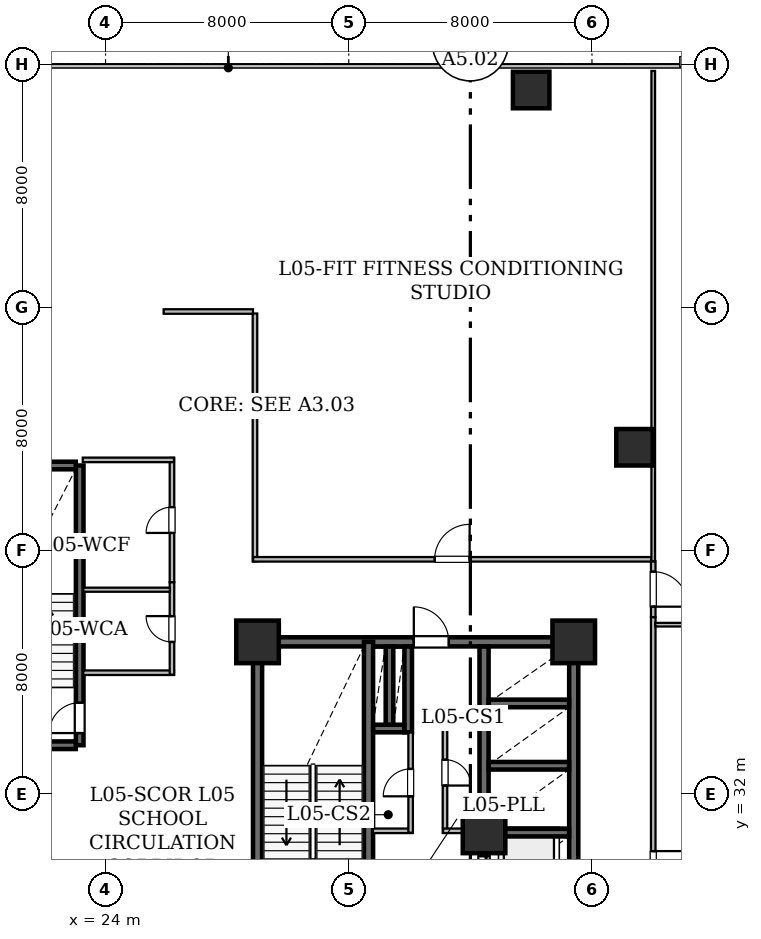
"""IFC4 building model, lengths in metres.
Left out: names, types, materials, properties, quantities, classifications, styles, units other than length and angle.
Written with IfcOpenShell. Run it as: python <this file> out.ifc"""

import sys

from ifc_helpers import new_model, si_unit, direction, frame, frame_2d, origin, origin_2d, place, context, subcontext, project, spatial, rectangle, hollow_rectangle, extrude, element, fill, save


model = new_model("IFC4")
c1 = context("Model", 3, precision=1e-05, world=origin(), true_north=direction((0.0, 1.0)))
c2 = subcontext(c1, "Body", "Model", "MODEL_VIEW")
j1 = project(units=[si_unit("LENGTHUNIT", "METRE"), si_unit("PLANEANGLEUNIT", "RADIAN")], contexts=[c1])
p1 = place(None, origin())
s1 = spatial("IfcSite", under=j1, at=p1, CompositionType="ELEMENT")
p2 = place(p1, origin())
s2 = spatial("IfcBuilding", under=s1, at=p2, CompositionType="ELEMENT")
p3 = place(p2, frame((0.0, 0.0, 24.6)))
s3 = spatial("IfcBuildingStorey", under=s2, at=p3, CompositionType="ELEMENT", Elevation=24.6)
for number, where, z_axis, x_axis in (
    (1, (29.0, 37.0, 0.0), (0.0, 0.0, 1.0), (1.0, 0.0, 0.0)),
    (2, (36.45, 30.75, 0.0), (0.0, 0.0, 1.0), (1.0, 0.0, 0.0)),
    (3, (39.4, 37.0, 0.0), (0.0, 0.0, 1.0), (1.0, 0.0, 0.0)),
):
    element("IfcColumn", number, at=place(p3, frame(where, z_axis=z_axis, x_axis=x_axis)), inside=s3, PredefinedType="COLUMN", context=c2, shape_type="SweptSolid", body=[
        extrude(hollow_rectangle(XDim=1.4, YDim=1.4, WallThickness=0.07, at=origin_2d()), origin(), (0.0, 0.0, 1.0), 4.2),
    ])
for number, where, z_axis, x_axis in (
    (4, (38.0, 55.15, 0.0), (0.0, 0.0, 1.0), (1.0, 0.0, 0.0)),
    (5, (41.4, 43.4, 0.0), (0.0, 0.0, 1.0), (1.0, 0.0, 0.0)),
):
    element("IfcColumn", number, at=place(p3, frame(where, z_axis=z_axis, x_axis=x_axis)), inside=s3, PredefinedType="COLUMN", context=c2, shape_type="SweptSolid", body=[
        extrude(hollow_rectangle(XDim=1.2, YDim=1.2, WallThickness=0.06, at=origin_2d()), origin(), (0.0, 0.0, 1.0), 4.2),
    ])
p4 = place(p3, frame((29.0, 28.0, 0.0), z_axis=(0.0, 0.0, 1.0), x_axis=(0.0, 1.0, 0.0)))
e6 = element("IfcWall", 6, at=p4, inside=s3, PredefinedType="SHEAR", context=c2, shape_type="SweptSolid", body=[
    extrude(rectangle(XDim=9.0, YDim=0.3, at=frame_2d((4.5, 0.0))), origin(), (0.0, 0.0, 1.0), 3.92),
])
p5 = place(p3, frame((29.0, 37.0, 0.0), z_axis=(0.0, 0.0, 1.0), x_axis=(1.0, 0.0, 0.0)))
e7 = element("IfcWall", 7, at=p5, inside=s3, PredefinedType="SHEAR", context=c2, shape_type="SweptSolid", body=[
    extrude(rectangle(XDim=10.4, YDim=0.3, at=frame_2d((5.2, 0.0))), origin(), (0.0, 0.0, 1.0), 3.92),
])
p6 = place(p5, frame((5.14, 0.0, 0.0)))
e8 = element("IfcOpeningElement", 8, at=p6, cuts=e7, PredefinedType="OPENING", context=c2, shape_type="SweptSolid", body=[
    extrude(rectangle(XDim=1.15, YDim=2.2, at=frame_2d((0.575, 1.1))), frame((0.0, 0.16, 0.0), z_axis=(0.0, -1.0, 0.0), x_axis=(1.0, 0.0, 0.0)), (0.0, 0.0, 1.0), 0.32),
])
p7 = place(p3, frame((39.4, 24.4, 0.0), z_axis=(0.0, 0.0, 1.0), x_axis=(0.0, 1.0, 0.0)))
e9 = element("IfcWall", 9, at=p7, inside=s3, PredefinedType="SHEAR", context=c2, shape_type="SweptSolid", body=[
    extrude(rectangle(XDim=12.6, YDim=0.3, at=frame_2d((6.3, 0.0))), origin(), (0.0, 0.0, 1.0), 3.92),
])
p8 = place(p3, frame((32.65, 28.0, 0.0), z_axis=(0.0, 0.0, 1.0), x_axis=(0.0, 1.0, 0.0)))
e10 = element("IfcWall", 10, at=p8, inside=s3, PredefinedType="SHEAR", context=c2, shape_type="SweptSolid", body=[
    extrude(rectangle(XDim=9.0, YDim=0.3, at=frame_2d((4.5, 0.0))), origin(), (0.0, 0.0, 1.0), 3.92),
])
p9 = place(p8, frame((0.72, 0.0, 0.0)))
e11 = element("IfcOpeningElement", 11, at=p9, cuts=e10, PredefinedType="OPENING", context=c2, shape_type="SweptSolid", body=[
    extrude(rectangle(XDim=1.0, YDim=2.15, at=frame_2d((0.5, 1.075))), frame((0.0, 0.16, 0.0), z_axis=(0.0, -1.0, 0.0), x_axis=(1.0, 0.0, 0.0)), (0.0, 0.0, 1.0), 0.32),
])
p10 = place(p3, frame((36.45, 25.1, 0.0), z_axis=(0.0, 0.0, 1.0), x_axis=(0.0, 1.0, 0.0)))
e12 = element("IfcWall", 12, at=p10, inside=s3, PredefinedType="SHEAR", context=c2, shape_type="SweptSolid", body=[
    extrude(rectangle(XDim=4.95, YDim=0.3, at=frame_2d((2.475, 0.0))), origin(), (0.0, 0.0, 1.0), 3.92),
])
p11 = place(p10, frame((0.12, 0.0, 0.0)))
e13 = element("IfcOpeningElement", 13, at=p11, cuts=e12, PredefinedType="OPENING", context=c2, shape_type="SweptSolid", body=[
    extrude(rectangle(XDim=1.05, YDim=2.15, at=frame_2d((0.525, 1.075))), frame((0.0, 0.16, 0.0), z_axis=(0.0, -1.0, 0.0), x_axis=(1.0, 0.0, 0.0)), (0.0, 0.0, 1.0), 0.32),
])
p12 = place(p10, frame((1.995, 0.0, 0.0)))
e14 = element("IfcOpeningElement", 14, at=p12, cuts=e12, PredefinedType="OPENING", context=c2, shape_type="SweptSolid", body=[
    extrude(rectangle(XDim=1.05, YDim=2.15, at=frame_2d((0.525, 1.075))), frame((0.0, 0.16, 0.0), z_axis=(0.0, -1.0, 0.0), x_axis=(1.0, 0.0, 0.0)), (0.0, 0.0, 1.0), 0.32),
])
p13 = place(p10, frame((3.795, 0.0, 0.0)))
e15 = element("IfcOpeningElement", 15, at=p13, cuts=e12, PredefinedType="OPENING", context=c2, shape_type="SweptSolid", body=[
    extrude(rectangle(XDim=1.05, YDim=2.15, at=frame_2d((0.525, 1.075))), frame((0.0, 0.16, 0.0), z_axis=(0.0, -1.0, 0.0), x_axis=(1.0, 0.0, 0.0)), (0.0, 0.0, 1.0), 0.32),
])
p14 = place(p3, frame((36.45, 31.45, 0.0), z_axis=(0.0, 0.0, 1.0), x_axis=(0.0, 1.0, 0.0)))
e16 = element("IfcWall", 16, at=p14, inside=s3, PredefinedType="SHEAR", context=c2, shape_type="SweptSolid", body=[
    extrude(rectangle(XDim=5.396, YDim=0.3, at=frame_2d((2.698, 0.0))), origin(), (0.0, 0.0, 1.0), 3.92),
])
for number, where, z_axis, x_axis in (
    (17, (36.604, 30.725, 0.0), (0.0, 0.0, 1.0), (1.0, 0.0, 0.0)),
    (18, (36.604, 32.925, 0.0), (0.0, 0.0, 1.0), (1.0, 0.0, 0.0)),
    (19, (36.604, 34.975, 0.0), (0.0, 0.0, 1.0), (1.0, 0.0, 0.0)),
):
    element("IfcWall", number, at=place(p3, frame(where, z_axis=z_axis, x_axis=x_axis)), inside=s3, PredefinedType="SHEAR", context=c2, shape_type="SweptSolid", body=[
        extrude(rectangle(XDim=2.642, YDim=0.25, at=frame_2d((1.321, 0.0))), origin(), (0.0, 0.0, 1.0), 3.92),
    ])
p15 = place(p3, frame((33.955, 34.025, 0.0), z_axis=(0.0, 0.0, 1.0), x_axis=(0.0, 1.0, 0.0)))
e20 = element("IfcWall", 20, at=p15, inside=s3, PredefinedType="SHEAR", context=c2, shape_type="SweptSolid", body=[
    extrude(rectangle(XDim=2.821, YDim=0.25, at=frame_2d((1.411, 0.0))), origin(), (0.0, 0.0, 1.0), 3.92),
])
p16 = place(p3, frame((32.804, 34.15, 0.0), z_axis=(0.0, 0.0, 1.0), x_axis=(1.0, 0.0, 0.0)))
e21 = element("IfcWall", 21, at=p16, inside=s3, PredefinedType="SHEAR", context=c2, shape_type="SweptSolid", body=[
    extrude(rectangle(XDim=1.022, YDim=0.25, at=frame_2d((0.511, 0.0))), origin(), (0.0, 0.0, 1.0), 3.92),
])
p17 = place(p3, frame((33.34, 34.279, 0.0), z_axis=(0.0, 0.0, 1.0), x_axis=(0.0, 1.0, 0.0)))
e22 = element("IfcWall", 22, at=p17, inside=s3, PredefinedType="SHEAR", context=c2, shape_type="SweptSolid", body=[
    extrude(rectangle(XDim=2.567, YDim=0.25, at=frame_2d((1.283, 0.0))), origin(), (0.0, 0.0, 1.0), 3.92),
])
p18 = place(p3, frame((23.15, 33.6, 0.0), z_axis=(0.0, 0.0, 1.0), x_axis=(0.0, 1.0, 0.0)))
e23 = element("IfcWall", 23, at=p18, inside=s3, PredefinedType="SHEAR", context=c2, shape_type="SweptSolid", body=[
    extrude(rectangle(XDim=9.2, YDim=0.25, at=frame_2d((4.6, 0.0))), origin(), (0.0, 0.0, 1.0), 3.92),
])
p19 = place(p18, frame((0.4, 0.0, 0.0)))
e24 = element("IfcOpeningElement", 24, at=p19, cuts=e23, PredefinedType="OPENING", context=c2, shape_type="SweptSolid", body=[
    extrude(rectangle(XDim=1.0, YDim=2.15, at=frame_2d((0.5, 1.075))), frame((0.0, 0.135, 0.0), z_axis=(0.0, -1.0, 0.0), x_axis=(1.0, 0.0, 0.0)), (0.0, 0.0, 1.0), 0.27),
])
for number, where, z_axis, x_axis in (
    (25, (19.329, 33.6, 0.0), (0.0, 0.0, 1.0), (1.0, 0.0, 0.0)),
    (26, (19.329, 42.8, 0.0), (0.0, 0.0, 1.0), (1.0, 0.0, 0.0)),
):
    element("IfcWall", number, at=place(p3, frame(where, z_axis=z_axis, x_axis=x_axis)), inside=s3, PredefinedType="SHEAR", context=c2, shape_type="SweptSolid", body=[
        extrude(rectangle(XDim=3.692, YDim=0.25, at=frame_2d((1.846, 0.0))), origin(), (0.0, 0.0, 1.0), 3.92),
    ])
p20 = place(p3, frame((36.306, 34.615, 0.0), z_axis=(0.0, 0.0, 1.0), x_axis=(-1.0, 0.0, 0.0)))
e27 = element("IfcWall", 27, at=p20, inside=s3, PredefinedType="STANDARD", context=c2, shape_type="SweptSolid", body=[
    extrude(rectangle(XDim=1.206, YDim=0.15, at=frame_2d((0.603, 0.0))), origin(), (0.0, 0.0, 1.0), 3.92),
])
p21 = place(p3, frame((35.165, 34.678, 0.0), z_axis=(0.0, 0.0, 1.0), x_axis=(0.0, -1.0, 0.0)))
e28 = element("IfcWall", 28, at=p21, inside=s3, PredefinedType="STANDARD", context=c2, shape_type="SweptSolid", body=[
    extrude(rectangle(XDim=3.958, YDim=0.15, at=frame_2d((1.979, 0.0))), origin(), (0.0, 0.0, 1.0), 3.92),
])
p22 = place(p21, frame((1.554, 0.0, 0.0)))
e29 = element("IfcOpeningElement", 29, at=p22, cuts=e28, PredefinedType="OPENING", context=c2, shape_type="SweptSolid", body=[
    extrude(rectangle(XDim=0.85, YDim=2.1, at=frame_2d((0.425, 1.05))), frame((0.0, 0.085, 0.0), z_axis=(0.0, -1.0, 0.0), x_axis=(1.0, 0.0, 0.0)), (0.0, 0.0, 1.0), 0.17),
])
p23 = place(p3, frame((35.102, 30.785, 0.0), z_axis=(0.0, 0.0, 1.0), x_axis=(1.0, 0.0, 0.0)))
e30 = element("IfcWall", 30, at=p23, inside=s3, PredefinedType="STANDARD", context=c2, shape_type="SweptSolid", body=[
    extrude(rectangle(XDim=1.198, YDim=0.15, at=frame_2d((0.599, 0.0))), origin(), (0.0, 0.0, 1.0), 3.92),
])
p24 = place(p3, frame((32.794, 30.785, 0.0), z_axis=(0.0, 0.0, 1.0), x_axis=(1.0, 0.0, 0.0)))
e31 = element("IfcWall", 31, at=p24, inside=s3, PredefinedType="STANDARD", context=c2, shape_type="SweptSolid", body=[
    extrude(rectangle(XDim=1.306, YDim=0.15, at=frame_2d((0.653, 0.0))), origin(), (0.0, 0.0, 1.0), 3.377),
])
p25 = place(p3, frame((34.035, 30.72, 0.0), z_axis=(0.0, 0.0, 1.0), x_axis=(0.0, 1.0, 0.0)))
e32 = element("IfcWall", 32, at=p25, inside=s3, PredefinedType="STANDARD", context=c2, shape_type="SweptSolid", body=[
    extrude(rectangle(XDim=3.3, YDim=0.15, at=frame_2d((1.65, 0.0))), origin(), (0.0, 0.0, 1.0), 3.92),
])
p26 = place(p25, frame((1.2, 0.0, 0.0)))
e33 = element("IfcOpeningElement", 33, at=p26, cuts=e32, PredefinedType="OPENING", context=c2, shape_type="SweptSolid", body=[
    extrude(rectangle(XDim=0.9, YDim=2.1, at=frame_2d((0.45, 1.05))), frame((0.0, 0.085, 0.0), z_axis=(0.0, -1.0, 0.0), x_axis=(1.0, 0.0, 0.0)), (0.0, 0.0, 1.0), 0.17),
])
p27 = place(p3, frame((23.267, 35.985, 0.0), z_axis=(0.0, 0.0, 1.0), x_axis=(1.0, 0.0, 0.0)))
e34 = element("IfcWall", 34, at=p27, inside=s3, PredefinedType="STANDARD", context=c2, shape_type="SweptSolid", body=[
    extrude(rectangle(XDim=2.983, YDim=0.15, at=frame_2d((1.491, 0.0))), origin(), (0.0, 0.0, 1.0), 3.92),
])
p28 = place(p3, frame((26.185, 35.922, 0.0), z_axis=(0.0, 0.0, 1.0), x_axis=(0.0, 1.0, 0.0)))
e35 = element("IfcWall", 35, at=p28, inside=s3, PredefinedType="STANDARD", context=c2, shape_type="SweptSolid", body=[
    extrude(rectangle(XDim=3.042, YDim=0.15, at=frame_2d((1.521, 0.0))), origin(), (0.0, 0.0, 1.0), 3.92),
])
p29 = place(p28, frame((1.075, 0.0, 0.0)))
e36 = element("IfcOpeningElement", 36, at=p29, cuts=e35, PredefinedType="OPENING", context=c2, shape_type="SweptSolid", body=[
    extrude(rectangle(XDim=0.85, YDim=2.1, at=frame_2d((0.425, 1.05))), frame((0.0, 0.085, 0.0), z_axis=(0.0, -1.0, 0.0), x_axis=(1.0, 0.0, 0.0)), (0.0, 0.0, 1.0), 0.17),
])
p30 = place(p3, frame((26.185, 38.964, 0.0), z_axis=(0.0, 0.0, 1.0), x_axis=(0.0, 1.0, 0.0)))
e37 = element("IfcWall", 37, at=p30, inside=s3, PredefinedType="STANDARD", context=c2, shape_type="SweptSolid", body=[
    extrude(rectangle(XDim=4.086, YDim=0.15, at=frame_2d((2.043, 0.0))), origin(), (0.0, 0.0, 1.0), 3.92),
])
p31 = place(p30, frame((1.618, 0.0, 0.0)))
e38 = element("IfcOpeningElement", 38, at=p31, cuts=e37, PredefinedType="OPENING", context=c2, shape_type="SweptSolid", body=[
    extrude(rectangle(XDim=0.85, YDim=2.1, at=frame_2d((0.425, 1.05))), frame((0.0, 0.085, 0.0), z_axis=(0.0, -1.0, 0.0), x_axis=(1.0, 0.0, 0.0)), (0.0, 0.0, 1.0), 0.17),
])
p32 = place(p3, frame((26.25, 42.985, 0.0), z_axis=(0.0, 0.0, 1.0), x_axis=(-1.0, 0.0, 0.0)))
e39 = element("IfcWall", 39, at=p32, inside=s3, PredefinedType="STANDARD", context=c2, shape_type="SweptSolid", body=[
    extrude(rectangle(XDim=3.0, YDim=0.15, at=frame_2d((1.5, 0.0))), origin(), (0.0, 0.0, 1.0), 3.92),
])
p33 = place(p3, frame((42.015, 37.814, 0.0), z_axis=(0.0, 0.0, 1.0), x_axis=(0.0, -1.0, 0.0)))
e40 = element("IfcWall", 40, at=p33, inside=s3, PredefinedType="STANDARD", context=c2, shape_type="SweptSolid", body=[
    extrude(rectangle(XDim=16.5, YDim=0.15, at=frame_2d((8.25, 0.0))), origin(), (0.0, 0.0, 1.0), 3.055),
])
p34 = place(p33, frame((7.696, 0.0, 0.0)))
e41 = element("IfcOpeningElement", 41, at=p34, cuts=e40, PredefinedType="OPENING", context=c2, shape_type="SweptSolid", body=[
    extrude(rectangle(XDim=1.15, YDim=2.2, at=frame_2d((0.575, 1.1))), frame((0.0, 0.085, 0.0), z_axis=(0.0, -1.0, 0.0), x_axis=(1.0, 0.0, 0.0)), (0.0, 0.0, 1.0), 0.17),
])
p35 = place(p3, frame((42.015, 39.65, 0.0), z_axis=(0.0, 0.0, 1.0), x_axis=(0.0, -1.0, 0.0)))
e42 = element("IfcWall", 42, at=p35, inside=s3, PredefinedType="STANDARD", context=c2, shape_type="SweptSolid", body=[
    extrude(rectangle(XDim=1.836, YDim=0.15, at=frame_2d((0.918, 0.0))), origin(), (0.0, 0.0, 1.0), 3.503),
])
p36 = place(p35, frame((0.343, 0.0, 0.0)))
e43 = element("IfcOpeningElement", 43, at=p36, cuts=e42, PredefinedType="OPENING", context=c2, shape_type="SweptSolid", body=[
    extrude(rectangle(XDim=1.15, YDim=2.2, at=frame_2d((0.575, 1.1))), frame((0.0, 0.085, 0.0), z_axis=(0.0, -1.0, 0.0), x_axis=(1.0, 0.0, 0.0)), (0.0, 0.0, 1.0), 0.17),
])
p37 = place(p3, frame((25.911, 47.865, 0.0), z_axis=(0.0, 0.0, 1.0), x_axis=(1.0, 0.0, 0.0)))
e44 = element("IfcWall", 44, at=p37, inside=s3, PredefinedType="STANDARD", context=c2, shape_type="SweptSolid", body=[
    extrude(rectangle(XDim=2.939, YDim=0.15, at=frame_2d((1.47, 0.0))), origin(), (0.0, 0.0, 1.0), 3.92),
])
p38 = place(p3, frame((28.915, 47.8, 0.0), z_axis=(0.0, 0.0, 1.0), x_axis=(0.0, -1.0, 0.0)))
e45 = element("IfcWall", 45, at=p38, inside=s3, PredefinedType="STANDARD", context=c2, shape_type="SweptSolid", body=[
    extrude(rectangle(XDim=8.15, YDim=0.15, at=frame_2d((4.075, 0.0))), origin(), (0.0, 0.0, 1.0), 3.055),
])
p39 = place(p3, frame((28.852, 39.715, 0.0), z_axis=(0.0, 0.0, 1.0), x_axis=(1.0, 0.0, 0.0)))
e46 = element("IfcWall", 46, at=p39, inside=s3, PredefinedType="STANDARD", context=c2, shape_type="SweptSolid", body=[
    extrude(rectangle(XDim=13.098, YDim=0.15, at=frame_2d((6.549, 0.0))), origin(), (0.0, 0.0, 1.0), 3.055),
])
p40 = place(p39, frame((5.974, 0.0, 0.0)))
e47 = element("IfcOpeningElement", 47, at=p40, cuts=e46, PredefinedType="OPENING", context=c2, shape_type="SweptSolid", body=[
    extrude(rectangle(XDim=1.15, YDim=2.2, at=frame_2d((0.575, 1.1))), frame((0.0, 0.085, 0.0), z_axis=(0.0, -1.0, 0.0), x_axis=(1.0, 0.0, 0.0)), (0.0, 0.0, 1.0), 0.17),
])
p41 = place(p3, frame((23.267, 38.715, 0.0), z_axis=(0.0, 0.0, 1.0), x_axis=(1.0, 0.0, 0.0)))
e48 = element("IfcWall", 48, at=p41, inside=s3, PredefinedType="PARTITIONING", context=c2, shape_type="SweptSolid", body=[
    extrude(rectangle(XDim=2.851, YDim=0.135, at=frame_2d((1.425, 0.0))), origin(), (0.0, 0.0, 1.0), 3.92),
])
p42 = place(p3, frame((42.082, 37.565, 0.0), z_axis=(0.0, 0.0, 1.0), x_axis=(1.0, 0.0, 0.0)))
e49 = element("IfcWall", 49, at=p42, inside=s3, PredefinedType="PARTITIONING", context=c2, shape_type="SweptSolid", body=[
    extrude(rectangle(XDim=13.686, YDim=0.12, at=frame_2d((6.843, 0.0))), origin(), (0.0, 0.0, 1.0), 3.055),
])
p43 = place(p3, frame((42.015, 39.65, 0.0), z_axis=(0.0, 0.0, 1.0), x_axis=(0.0, 1.0, 0.0)))
e50 = element("IfcWall", 50, at=p43, inside=s3, PredefinedType="PARTITIONING", context=c2, shape_type="SweptSolid", body=[
    extrude(rectangle(XDim=16.128, YDim=0.12, at=frame_2d((8.064, 0.0))), origin(), (0.0, 0.0, 1.0), 3.055),
])
p44 = place(p6, origin())
e51 = element("IfcDoor", 51, at=p44, inside=s3, OperationType="SINGLE_SWING_LEFT", PredefinedType="DOOR", context=c2, shape_type="SweptSolid", body=[
    extrude(rectangle(XDim=1.15, YDim=2.2, at=frame_2d((0.575, 1.1))), frame((0.0, 0.025, 0.0), z_axis=(0.0, -1.0, 0.0), x_axis=(1.0, 0.0, 0.0)), (0.0, 0.0, 1.0), 0.05),
])
fill(e8, e51)
p45 = place(p13, origin())
e52 = element("IfcDoor", 52, at=p45, inside=s3, OperationType="SLIDING_TO_LEFT", PredefinedType="DOOR", context=c2, shape_type="SweptSolid", body=[
    extrude(rectangle(XDim=1.05, YDim=2.15, at=frame_2d((0.525, 1.075))), frame((0.0, 0.025, 0.0), z_axis=(0.0, -1.0, 0.0), x_axis=(1.0, 0.0, 0.0)), (0.0, 0.0, 1.0), 0.05),
])
fill(e15, e52)
p46 = place(p19, origin())
e53 = element("IfcDoor", 53, at=p46, inside=s3, OperationType="SINGLE_SWING_LEFT", PredefinedType="DOOR", context=c2, shape_type="SweptSolid", body=[
    extrude(rectangle(XDim=1.0, YDim=2.15, at=frame_2d((0.5, 1.075))), frame((0.0, 0.025, 0.0), z_axis=(0.0, -1.0, 0.0), x_axis=(1.0, 0.0, 0.0)), (0.0, 0.0, 1.0), 0.05),
])
fill(e24, e53)
p47 = place(p22, origin())
e54 = element("IfcDoor", 54, at=p47, inside=s3, OperationType="SINGLE_SWING_RIGHT", PredefinedType="DOOR", context=c2, shape_type="SweptSolid", body=[
    extrude(rectangle(XDim=0.85, YDim=2.1, at=frame_2d((0.425, 1.05))), frame((0.0, 0.025, 0.0), z_axis=(0.0, -1.0, 0.0), x_axis=(1.0, 0.0, 0.0)), (0.0, 0.0, 1.0), 0.05),
])
fill(e29, e54)
p48 = place(p26, origin())
e55 = element("IfcDoor", 55, at=p48, inside=s3, OperationType="SINGLE_SWING_LEFT", PredefinedType="DOOR", context=c2, shape_type="SweptSolid", body=[
    extrude(rectangle(XDim=0.9, YDim=2.1, at=frame_2d((0.45, 1.05))), frame((0.0, 0.025, 0.0), z_axis=(0.0, -1.0, 0.0), x_axis=(1.0, 0.0, 0.0)), (0.0, 0.0, 1.0), 0.05),
])
fill(e33, e55)
p49 = place(p29, origin())
e56 = element("IfcDoor", 56, at=p49, inside=s3, OperationType="SINGLE_SWING_RIGHT", PredefinedType="DOOR", context=c2, shape_type="SweptSolid", body=[
    extrude(rectangle(XDim=0.85, YDim=2.1, at=frame_2d((0.425, 1.05))), frame((0.0, 0.025, 0.0), z_axis=(0.0, -1.0, 0.0), x_axis=(1.0, 0.0, 0.0)), (0.0, 0.0, 1.0), 0.05),
])
fill(e36, e56)
p50 = place(p31, origin())
e57 = element("IfcDoor", 57, at=p50, inside=s3, OperationType="SINGLE_SWING_LEFT", PredefinedType="DOOR", context=c2, shape_type="SweptSolid", body=[
    extrude(rectangle(XDim=0.85, YDim=2.1, at=frame_2d((0.425, 1.05))), frame((0.0, 0.025, 0.0), z_axis=(0.0, -1.0, 0.0), x_axis=(1.0, 0.0, 0.0)), (0.0, 0.0, 1.0), 0.05),
])
fill(e38, e57)
p51 = place(p34, origin())
e58 = element("IfcDoor", 58, at=p51, inside=s3, OperationType="SINGLE_SWING_LEFT", PredefinedType="DOOR", context=c2, shape_type="SweptSolid", body=[
    extrude(rectangle(XDim=1.15, YDim=2.2, at=frame_2d((0.575, 1.1))), frame((0.0, 0.025, 0.0), z_axis=(0.0, -1.0, 0.0), x_axis=(1.0, 0.0, 0.0)), (0.0, 0.0, 1.0), 0.05),
])
fill(e41, e58)
p52 = place(p36, origin())
e59 = element("IfcDoor", 59, at=p52, inside=s3, OperationType="SINGLE_SWING_RIGHT", PredefinedType="DOOR", context=c2, shape_type="SweptSolid", body=[
    extrude(rectangle(XDim=1.15, YDim=2.2, at=frame_2d((0.575, 1.1))), frame((0.0, 0.025, 0.0), z_axis=(0.0, -1.0, 0.0), x_axis=(1.0, 0.0, 0.0)), (0.0, 0.0, 1.0), 0.05),
])
fill(e43, e59)
p53 = place(p40, origin())
e60 = element("IfcDoor", 60, at=p53, inside=s3, OperationType="SINGLE_SWING_RIGHT", PredefinedType="DOOR", context=c2, shape_type="SweptSolid", body=[
    extrude(rectangle(XDim=1.15, YDim=2.2, at=frame_2d((0.575, 1.1))), frame((0.0, 0.025, 0.0), z_axis=(0.0, -1.0, 0.0), x_axis=(1.0, 0.0, 0.0)), (0.0, 0.0, 1.0), 0.05),
])
fill(e47, e60)
save(model, sys.argv[1])
